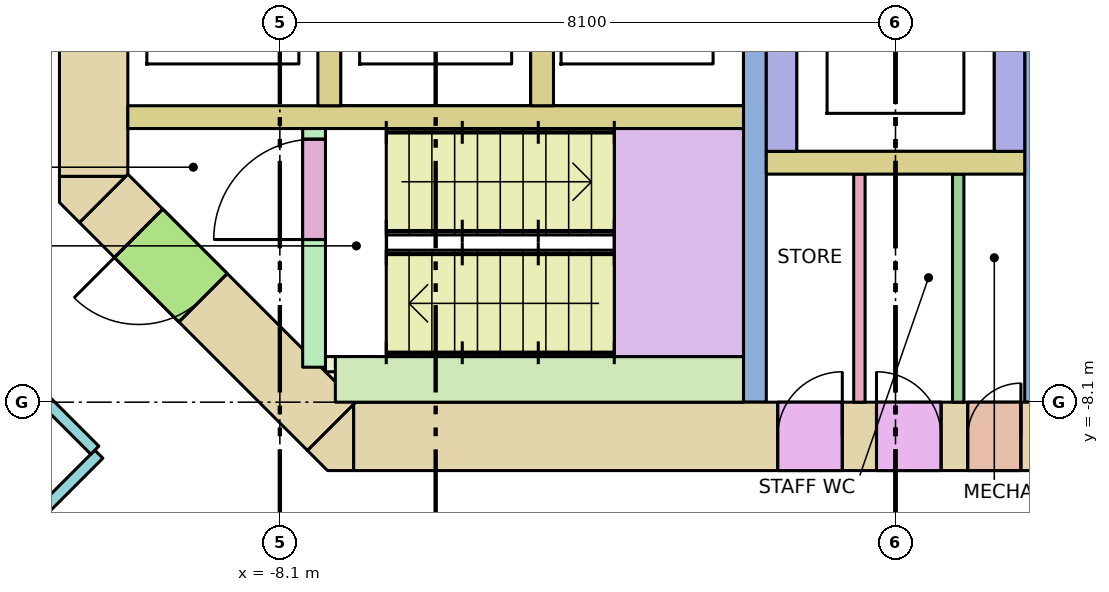
"""IFC4 building model, lengths in metres.
Left out: names, types, materials, properties, quantities, classifications, styles, units other than length and angle.
Written with IfcOpenShell. Run it as: python <this file> out.ifc"""

import sys

from ifc_helpers import new_model, si_unit, direction, frame, frame_2d, origin, place, context, subcontext, project, spatial, polyline, rectangle, outline, extrude, element, fill, save


model = new_model("IFC4")
c1 = context("Model", 3, precision=1e-05, world=origin(), true_north=direction((0.0, 1.0)))
c2 = subcontext(c1, "Body", "Model", "MODEL_VIEW")
j1 = project(units=[si_unit("LENGTHUNIT", "METRE"), si_unit("PLANEANGLEUNIT", "RADIAN")], contexts=[c1])
p1 = place(None, origin())
s1 = spatial("IfcSite", under=j1, at=p1, CompositionType="ELEMENT")
p2 = place(p1, origin())
s2 = spatial("IfcBuilding", under=s1, at=p2, CompositionType="ELEMENT")
p3 = place(p2, frame((0.0, 0.0, 142.8)))
s3 = spatial("IfcBuildingStorey", under=s2, at=p3, CompositionType="ELEMENT", Elevation=142.8)
p4 = place(p3, frame((-7.13, -8.55, -0.28), z_axis=(0.0, 0.0, 1.0), x_axis=(1.0, 0.0, 0.0)))
e1 = element("IfcWall", 1, at=p4, inside=s3, PredefinedType="SHEAR", context=c2, shape_type="SweptSolid", body=[
    extrude(rectangle(XDim=14.26, YDim=0.9, at=frame_2d((7.13, 0.0))), origin(), (0.0, 0.0, 1.0), 3.8),
])
p5 = place(p4, frame((8.08, 0.0, 0.28)))
e2 = element("IfcOpeningElement", 2, at=p5, cuts=e1, PredefinedType="OPENING", context=c2, shape_type="SweptSolid", body=[
    extrude(rectangle(XDim=0.7, YDim=2.1, at=frame_2d((0.35, 1.05))), frame((0.0, 0.46, 0.0), z_axis=(0.0, -1.0, 0.0), x_axis=(1.0, 0.0, 0.0)), (0.0, 0.0, 1.0), 0.92),
])
p6 = place(p4, frame((5.58, 0.0, 0.28)))
e3 = element("IfcOpeningElement", 3, at=p6, cuts=e1, PredefinedType="OPENING", context=c2, shape_type="SweptSolid", body=[
    extrude(rectangle(XDim=0.85, YDim=2.1, at=frame_2d((0.425, 1.05))), frame((0.0, 0.46, 0.0), z_axis=(0.0, -1.0, 0.0), x_axis=(1.0, 0.0, 0.0)), (0.0, 0.0, 1.0), 0.92),
])
p7 = place(p4, frame((6.88, 0.0, 0.28)))
e4 = element("IfcOpeningElement", 4, at=p7, cuts=e1, PredefinedType="OPENING", context=c2, shape_type="SweptSolid", body=[
    extrude(rectangle(XDim=0.85, YDim=2.1, at=frame_2d((0.425, 1.05))), frame((0.0, 0.46, 0.0), z_axis=(0.0, -1.0, 0.0), x_axis=(1.0, 0.0, 0.0)), (0.0, 0.0, 1.0), 0.92),
])
p8 = place(p4, frame((9.445, 0.0, 0.28)))
e5 = element("IfcOpeningElement", 5, at=p8, cuts=e1, PredefinedType="OPENING", context=c2, shape_type="SweptSolid", body=[
    extrude(rectangle(XDim=0.9, YDim=2.1, at=frame_2d((0.45, 1.05))), frame((0.0, 0.46, 0.0), z_axis=(0.0, -1.0, 0.0), x_axis=(1.0, 0.0, 0.0)), (0.0, 0.0, 1.0), 0.92),
])
p9 = place(p4, frame((11.431, 0.0, 0.28)))
e6 = element("IfcOpeningElement", 6, at=p9, cuts=e1, PredefinedType="OPENING", context=c2, shape_type="SweptSolid", body=[
    extrude(rectangle(XDim=0.9, YDim=2.1, at=frame_2d((0.45, 1.05))), frame((0.0, 0.46, 0.0), z_axis=(0.0, -1.0, 0.0), x_axis=(1.0, 0.0, 0.0)), (0.0, 0.0, 1.0), 0.92),
])
p10 = place(p3, frame((-10.55, -5.13, -0.28), z_axis=(0.0, 0.0, 1.0), x_axis=(0.0, 1.0, 0.0)))
e7 = element("IfcWall", 7, at=p10, inside=s3, PredefinedType="SHEAR", context=c2, shape_type="SweptSolid", body=[
    extrude(rectangle(XDim=10.26, YDim=0.9, at=frame_2d((5.13, 0.0))), origin(), (0.0, 0.0, 1.0), 3.8),
])
p11 = place(p10, frame((4.13, 0.0, 0.28)))
e8 = element("IfcOpeningElement", 8, at=p11, cuts=e7, PredefinedType="OPENING", context=c2, shape_type="SweptSolid", body=[
    extrude(rectangle(XDim=2.0, YDim=2.1, at=frame_2d((1.0, 1.05))), frame((0.0, 0.46, 0.0), z_axis=(0.0, -1.0, 0.0), x_axis=(1.0, 0.0, 0.0)), (0.0, 0.0, 1.0), 0.92),
])
p12 = place(p3, frame((-7.418, -8.418, -0.28), z_axis=(0.0, 0.0, 1.0), x_axis=(-0.707106781187, 0.707106781187, 0.0)))
e9 = element("IfcWall", 9, at=p12, inside=s3, PredefinedType="SHEAR", context=c2, shape_type="SweptSolid", body=[
    extrude(rectangle(XDim=4.243, YDim=0.9, at=frame_2d((2.121, 0.0))), origin(), (0.0, 0.0, 1.0), 3.8),
])
p13 = place(p12, frame((2.393, 0.0, 0.28)))
e10 = element("IfcOpeningElement", 10, at=p13, cuts=e9, PredefinedType="OPENING", context=c2, shape_type="SweptSolid", body=[
    extrude(rectangle(XDim=1.2, YDim=2.1, at=frame_2d((0.6, 1.05))), frame((0.0, 0.46, 0.0), z_axis=(0.0, -1.0, 0.0), x_axis=(1.0, 0.0, 0.0)), (0.0, 0.0, 1.0), 0.92),
])
p14 = place(p3, frame((0.0, 0.0, -0.28)))
e11 = element("IfcWall", 11, at=p14, inside=s3, PredefinedType="SHEAR", context=c2, shape_type="SweptSolid", body=[
    extrude(outline(polyline([(-7.473, -9.0), (-7.736, -8.736), (-7.13, -8.13), (-7.13, -9.0), (-7.473, -9.0)])), origin(), (0.0, 0.0, 1.0), 3.8),
])
p15 = place(p3, frame((0.0, 0.0, -0.28)))
e12 = element("IfcWall", 12, at=p15, inside=s3, PredefinedType="SHEAR", context=c2, shape_type="SweptSolid", body=[
    extrude(outline(polyline([(-11.0, -5.473), (-11.0, -5.13), (-10.13, -5.13), (-10.736, -5.736), (-11.0, -5.473)])), origin(), (0.0, 0.0, 1.0), 3.8),
])
p16 = place(p3, frame((-10.1, -4.35, 0.0), z_axis=(0.0, 0.0, 1.0), x_axis=(1.0, 0.0, 0.0)))
e13 = element("IfcWall", 13, at=p16, inside=s3, PredefinedType="SOLIDWALL", context=c2, shape_type="SweptSolid", body=[
    extrude(rectangle(XDim=8.1, YDim=0.3, at=frame_2d((4.05, 0.0))), origin(), (0.0, 0.0, 1.0), 3.52),
])
for number, where, z_axis, x_axis in (
    (14, (-7.45, -4.2, 0.0), (0.0, 0.0, 1.0), (0.0, 1.0, 0.0)),
    (15, (-4.65, -4.2, 0.0), (0.0, 0.0, 1.0), (0.0, 1.0, 0.0)),
):
    element("IfcWall", number, at=place(p3, frame(where, z_axis=z_axis, x_axis=x_axis)), inside=s3, PredefinedType="SOLIDWALL", context=c2, shape_type="SweptSolid", body=[
        extrude(rectangle(XDim=2.4, YDim=0.3, at=frame_2d((1.2, 0.0))), origin(), (0.0, 0.0, 1.0), 3.52),
    ])
for number, where, z_axis, x_axis in (
    (16, (-1.85, -8.1, 0.0), (0.0, 0.0, 1.0), (0.0, 1.0, 0.0)),
    (17, (1.85, -8.1, 0.0), (0.0, 0.0, 1.0), (0.0, 1.0, 0.0)),
):
    element("IfcWall", number, at=place(p3, frame(where, z_axis=z_axis, x_axis=x_axis)), inside=s3, PredefinedType="SHEAR", context=c2, shape_type="SweptSolid", body=[
        extrude(rectangle(XDim=6.6, YDim=0.3, at=frame_2d((3.3, 0.0))), origin(), (0.0, 0.0, 1.0), 3.52),
    ])
for number, where, z_axis, x_axis in (
    (18, (-1.5, -4.8, 0.0), (0.0, 0.0, 1.0), (0.0, 1.0, 0.0)),
    (19, (1.5, -4.8, 0.0), (0.0, 0.0, 1.0), (0.0, 1.0, 0.0)),
):
    element("IfcWall", number, at=place(p3, frame(where, z_axis=z_axis, x_axis=x_axis)), inside=s3, PredefinedType="SOLIDWALL", context=c2, shape_type="SweptSolid", body=[
        extrude(rectangle(XDim=3.0, YDim=0.4, at=frame_2d((1.5, 0.0))), origin(), (0.0, 0.0, 1.0), 3.52),
    ])
p17 = place(p3, frame((-1.7, -4.95, 0.0), z_axis=(0.0, 0.0, 1.0), x_axis=(1.0, 0.0, 0.0)))
e20 = element("IfcWall", 20, at=p17, inside=s3, PredefinedType="SOLIDWALL", context=c2, shape_type="SweptSolid", body=[
    extrude(rectangle(XDim=3.4, YDim=0.3, at=frame_2d((1.7, 0.0))), origin(), (0.0, 0.0, 1.0), 3.52),
])
p18 = place(p3, frame((-7.65, -7.64, 0.0), z_axis=(0.0, 0.0, 1.0), x_axis=(0.0, 1.0, 0.0)))
e21 = element("IfcWall", 21, at=p18, inside=s3, PredefinedType="SHEAR", context=c2, shape_type="SweptSolid", body=[
    extrude(rectangle(XDim=3.14, YDim=0.3, at=frame_2d((1.57, 0.0))), origin(), (0.0, 0.0, 1.0), 3.52),
])
p19 = place(p18, frame((1.68, 0.0, 0.0)))
e22 = element("IfcOpeningElement", 22, at=p19, cuts=e21, PredefinedType="OPENING", context=c2, shape_type="SweptSolid", body=[
    extrude(rectangle(XDim=1.32, YDim=2.1, at=frame_2d((0.66, 1.05))), frame((0.0, 0.16, 0.0), z_axis=(0.0, -1.0, 0.0), x_axis=(1.0, 0.0, 0.0)), (0.0, 0.0, 1.0), 0.32),
])
p20 = place(p3, frame((-7.5, -7.6, 0.0), z_axis=(0.0, 0.0, 1.0), x_axis=(1.0, 0.0, 0.0)))
e23 = element("IfcWall", 23, at=p20, inside=s3, PredefinedType="SHEAR", context=c2, shape_type="SweptSolid", body=[
    extrude(rectangle(XDim=0.6, YDim=0.2, at=frame_2d((0.3, 0.0))), origin(), (0.0, 0.0, 1.0), 3.52),
])
p21 = place(p3, frame((-7.37, -7.8, 0.0), z_axis=(0.0, 0.0, 1.0), x_axis=(1.0, 0.0, 0.0)))
e24 = element("IfcWall", 24, at=p21, inside=s3, PredefinedType="SHEAR", context=c2, shape_type="SweptSolid", body=[
    extrude(rectangle(XDim=5.37, YDim=0.6, at=frame_2d((2.685, 0.0))), origin(), (0.0, 0.0, 1.0), 3.52),
])
for number, where, z_axis, x_axis in (
    (25, (0.825, -8.1, 0.0), (0.0, 0.0, 1.0), (0.0, 1.0, 0.0)),
    (26, (-0.475, -8.1, 0.0), (0.0, 0.0, 1.0), (0.0, 1.0, 0.0)),
):
    element("IfcWall", number, at=place(p3, frame(where, z_axis=z_axis, x_axis=x_axis)), inside=s3, PredefinedType="PARTITIONING", context=c2, shape_type="SweptSolid", body=[
        extrude(rectangle(XDim=3.0, YDim=0.15, at=frame_2d((1.5, 0.0))), origin(), (0.0, 0.0, 1.0), 3.52),
    ])
p22 = place(p3, frame((-14.035, -12.338, 0.0), z_axis=(0.0, 0.0, 1.0), x_axis=(0.707106781187, 0.707106781187, 0.0)))
e27 = element("IfcWall", 27, at=p22, inside=s3, PredefinedType="PARTITIONING", context=c2, shape_type="SweptSolid", body=[
    extrude(rectangle(XDim=5.026, YDim=0.15, at=frame_2d((2.513, 0.0))), origin(), (0.0, 0.0, 1.0), 3.52),
])
p23 = place(p22, frame((2.013, 0.0, 0.0)))
e28 = element("IfcOpeningElement", 28, at=p23, cuts=e27, PredefinedType="OPENING", context=c2, shape_type="SweptSolid", body=[
    extrude(rectangle(XDim=1.0, YDim=2.1, at=frame_2d((0.5, 1.05))), frame((0.0, 0.085, 0.0), z_axis=(0.0, -1.0, 0.0), x_axis=(1.0, 0.0, 0.0)), (0.0, 0.0, 1.0), 0.17),
])
p24 = place(p3, frame((-10.534, -8.731, 0.0), z_axis=(0.0, 0.0, 1.0), x_axis=(-0.707106781187, 0.707106781187, 0.0)))
e29 = element("IfcWall", 29, at=p24, inside=s3, PredefinedType="PARTITIONING", context=c2, shape_type="SweptSolid", body=[
    extrude(rectangle(XDim=3.399, YDim=0.15, at=frame_2d((1.7, 0.0))), origin(), (0.0, 0.0, 1.0), 2.62),
])
p25 = place(p19, origin())
e30 = element("IfcDoor", 30, at=p25, inside=s3, OperationType="DOUBLE_DOOR_SINGLE_SWING", PredefinedType="DOOR", context=c2, shape_type="SweptSolid", body=[
    extrude(rectangle(XDim=1.32, YDim=2.1, at=frame_2d((0.66, 1.05))), frame((0.0, 0.025, 0.0), z_axis=(0.0, -1.0, 0.0), x_axis=(1.0, 0.0, 0.0)), (0.0, 0.0, 1.0), 0.05),
])
fill(e22, e30)
p26 = place(p13, origin())
e31 = element("IfcDoor", 31, at=p26, inside=s3, OperationType="SINGLE_SWING_RIGHT", PredefinedType="DOOR", context=c2, shape_type="SweptSolid", body=[
    extrude(rectangle(XDim=1.2, YDim=2.1, at=frame_2d((0.6, 1.05))), frame((0.0, 0.025, 0.0), z_axis=(0.0, -1.0, 0.0), x_axis=(1.0, 0.0, 0.0)), (0.0, 0.0, 1.0), 0.05),
])
fill(e10, e31)
p27 = place(p5, origin())
e32 = element("IfcDoor", 32, at=p27, inside=s3, OperationType="SINGLE_SWING_RIGHT", PredefinedType="DOOR", context=c2, shape_type="SweptSolid", body=[
    extrude(rectangle(XDim=0.7, YDim=2.1, at=frame_2d((0.35, 1.05))), frame((0.0, 0.025, 0.0), z_axis=(0.0, -1.0, 0.0), x_axis=(1.0, 0.0, 0.0)), (0.0, 0.0, 1.0), 0.05),
])
fill(e2, e32)
p28 = place(p6, origin())
e33 = element("IfcDoor", 33, at=p28, inside=s3, OperationType="SINGLE_SWING_RIGHT", PredefinedType="DOOR", context=c2, shape_type="SweptSolid", body=[
    extrude(rectangle(XDim=0.85, YDim=2.1, at=frame_2d((0.425, 1.05))), frame((0.0, 0.025, 0.0), z_axis=(0.0, -1.0, 0.0), x_axis=(1.0, 0.0, 0.0)), (0.0, 0.0, 1.0), 0.05),
])
fill(e3, e33)
p29 = place(p7, origin())
e34 = element("IfcDoor", 34, at=p29, inside=s3, OperationType="SINGLE_SWING_LEFT", PredefinedType="DOOR", context=c2, shape_type="SweptSolid", body=[
    extrude(rectangle(XDim=0.85, YDim=2.1, at=frame_2d((0.425, 1.05))), frame((0.0, 0.025, 0.0), z_axis=(0.0, -1.0, 0.0), x_axis=(1.0, 0.0, 0.0)), (0.0, 0.0, 1.0), 0.05),
])
fill(e4, e34)
save(model, sys.argv[1])
